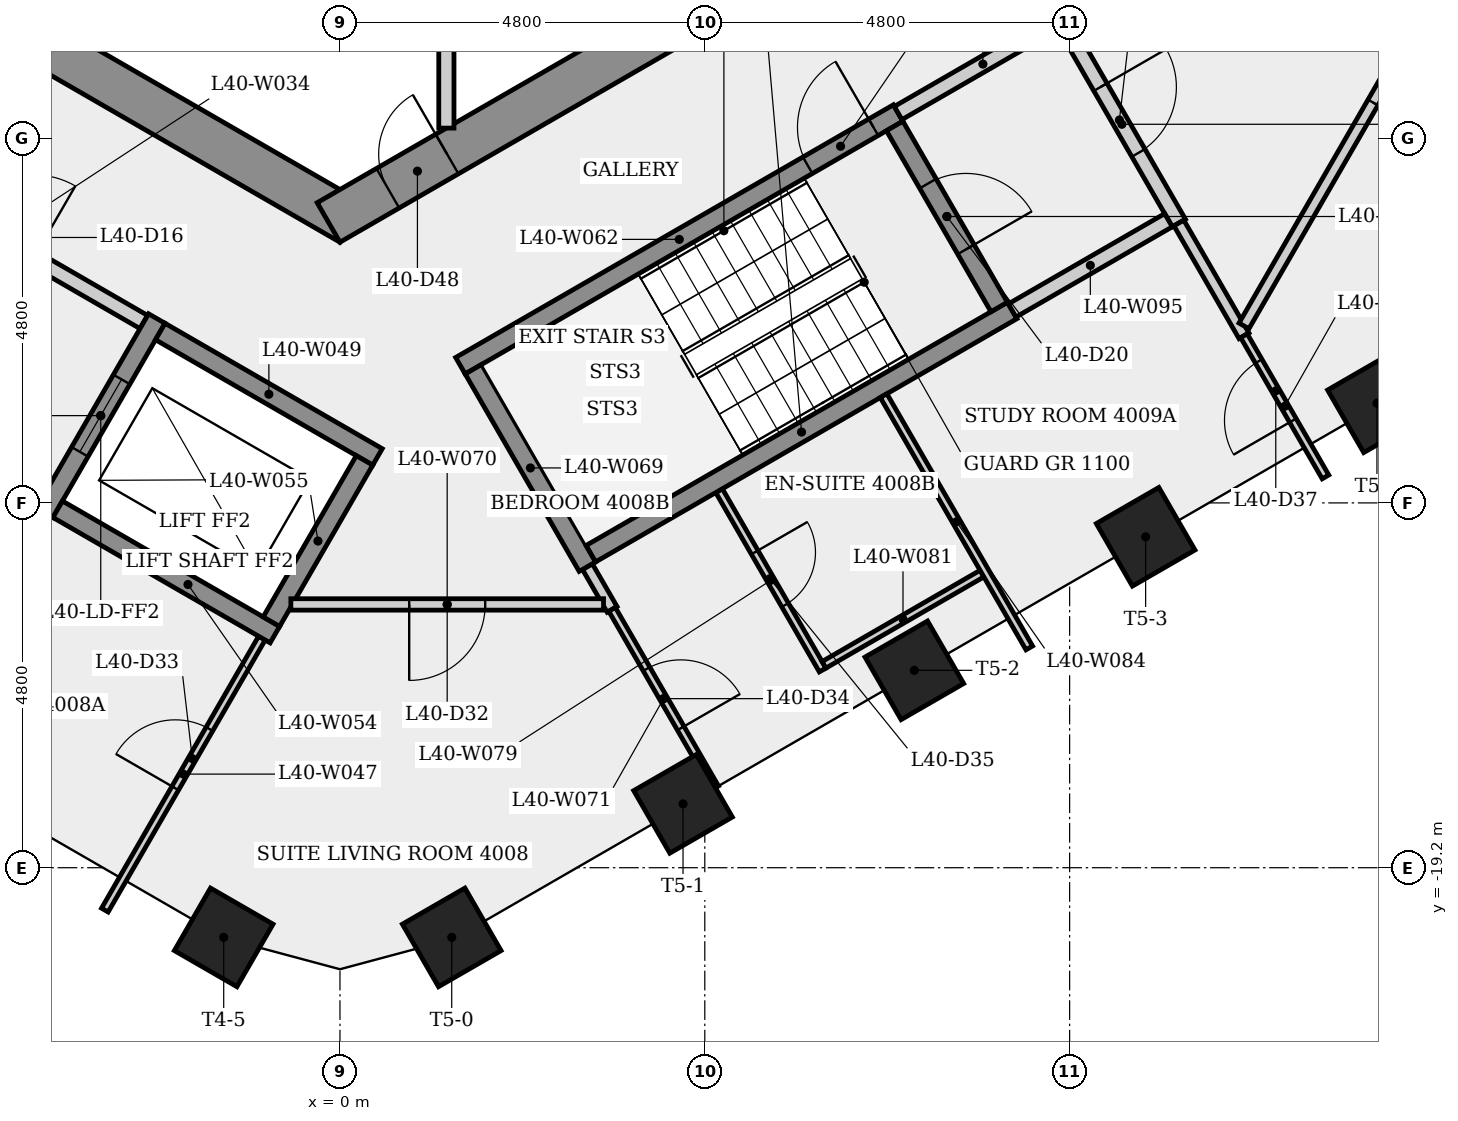
"""IFC4 building model, lengths in metres.
Left out: names, types, materials, properties, quantities, classifications, styles, units other than length and angle.
Written with IfcOpenShell. Run it as: python <this file> out.ifc"""

import sys

from ifc_helpers import new_model, si_unit, direction, frame, frame_2d, origin, origin_2d, place, context, subcontext, project, spatial, rectangle, extrude, element, fill, save


model = new_model("IFC4")
c1 = context("Model", 3, precision=1e-05, world=origin(), true_north=direction((0.0, 1.0)))
c2 = subcontext(c1, "Body", "Model", "MODEL_VIEW")
j1 = project(units=[si_unit("LENGTHUNIT", "METRE"), si_unit("PLANEANGLEUNIT", "RADIAN")], contexts=[c1])
p1 = place(None, origin())
s1 = spatial("IfcSite", under=j1, at=p1, CompositionType="ELEMENT")
p2 = place(p1, origin())
s2 = spatial("IfcBuilding", under=s1, at=p2, CompositionType="ELEMENT")
p3 = place(p2, frame((0.0, 0.0, 152.7)))
s3 = spatial("IfcBuildingStorey", under=s2, at=p3, CompositionType="ELEMENT", Elevation=152.7)
p4 = place(p3, frame((-9.35, -5.225, 0.0), z_axis=(0.0, 0.0, 1.0), x_axis=(0.866023993627, -0.500002442456, 0.0)))
e1 = element("IfcWall", 1, at=p4, inside=s3, PredefinedType="SHEAR", context=c2, shape_type="SweptSolid", body=[
    extrude(rectangle(XDim=10.97, YDim=0.6, at=frame_2d((5.485, 0.0))), origin(), (0.0, 0.0, 1.0), 3.4),
])
p5 = place(p4, frame((2.853, 0.0, 0.0)))
e2 = element("IfcOpeningElement", 2, at=p5, cuts=e1, PredefinedType="OPENING", context=c2, shape_type="SweptSolid", body=[
    extrude(rectangle(XDim=0.9, YDim=2.1, at=frame_2d((0.45, 1.05))), frame((0.0, 0.31, 0.0), z_axis=(0.0, -1.0, 0.0), x_axis=(1.0, 0.0, 0.0)), (0.0, 0.0, 1.0), 0.62),
])
p6 = place(p3, frame((-0.15, -10.71, 0.0), z_axis=(0.0, 0.0, 1.0), x_axis=(0.866023993627, 0.500002442456, 0.0)))
e3 = element("IfcWall", 3, at=p6, inside=s3, PredefinedType="SHEAR", context=c2, shape_type="SweptSolid", body=[
    extrude(rectangle(XDim=10.97, YDim=0.6, at=frame_2d((5.485, 0.0))), origin(), (0.0, 0.0, 1.0), 3.4),
])
p7 = place(p6, frame((0.9, 0.0, 0.0)))
e4 = element("IfcOpeningElement", 4, at=p7, cuts=e3, PredefinedType="OPENING", context=c2, shape_type="SweptSolid", body=[
    extrude(rectangle(XDim=0.9, YDim=2.1, at=frame_2d((0.45, 1.05))), frame((0.0, 0.31, 0.0), z_axis=(0.0, -1.0, 0.0), x_axis=(1.0, 0.0, 0.0)), (0.0, 0.0, 1.0), 0.62),
])
p8 = place(p6, frame((7.512, 0.0, 0.0)))
e5 = element("IfcOpeningElement", 5, at=p8, cuts=e3, PredefinedType="OPENING", context=c2, shape_type="SweptSolid", body=[
    extrude(rectangle(XDim=0.9, YDim=2.1, at=frame_2d((0.45, 1.05))), frame((0.0, 0.31, 0.0), z_axis=(0.0, -1.0, 0.0), x_axis=(1.0, 0.0, 0.0)), (0.0, 0.0, 1.0), 0.62),
])
for number, where, z_axis, x_axis in (
    (6, (-1.53, -20.117, 0.0), (0.0, 0.0, 1.0), (-0.5, -0.866, 0.0)),
    (7, (1.47, -20.117, 0.0), (0.0, 0.0, 1.0), (0.5, -0.866, 0.0)),
    (8, (4.514, -18.36, 0.0), (0.0, 0.0, 1.0), (0.5, -0.866, 0.0)),
    (9, (7.557, -16.603, 0.0), (0.0, 0.0, 1.0), (0.5, -0.866, 0.0)),
    (10, (10.6, -14.846, 0.0), (0.0, 0.0, 1.0), (0.5, -0.866, 0.0)),
    (11, (13.643, -13.089, 0.0), (0.0, 0.0, 1.0), (0.5, -0.866, 0.0)),
):
    element("IfcColumn", number, at=place(p3, frame(where, z_axis=z_axis, x_axis=x_axis)), inside=s3, PredefinedType="COLUMN", context=c2, shape_type="SweptSolid", body=[
        extrude(rectangle(XDim=0.95, YDim=0.95, at=origin_2d()), origin(), (0.0, 0.0, 1.0), 3.4),
    ])
p9 = place(p3, frame((-6.435, -9.795, 0.0), z_axis=(0.0, 0.0, 1.0), x_axis=(0.866012907634, -0.500021643343, 0.0)))
e12 = element("IfcWall", 12, at=p9, inside=s3, PredefinedType="PARTITIONING", context=c2, shape_type="SweptSolid", body=[
    extrude(rectangle(XDim=4.45, YDim=0.2, at=frame_2d((2.225, 0.0))), origin(), (0.0, 0.0, 1.0), 3.05),
])
p10 = place(p9, frame((1.675, 0.0, 0.0)))
e13 = element("IfcOpeningElement", 13, at=p10, cuts=e12, PredefinedType="OPENING", context=c2, shape_type="SweptSolid", body=[
    extrude(rectangle(XDim=1.1, YDim=2.1, at=frame_2d((0.55, 1.05))), frame((0.0, 0.11, 0.0), z_axis=(0.0, -1.0, 0.0), x_axis=(1.0, 0.0, 0.0)), (0.0, 0.0, 1.0), 0.22),
])
p11 = place(p3, frame((-3.094, -19.758, 0.0), z_axis=(0.0, 0.0, 1.0), x_axis=(0.500027577057, 0.866009481578, 0.0)))
e14 = element("IfcWall", 14, at=p11, inside=s3, PredefinedType="PARTITIONING", context=c2, shape_type="SweptSolid", body=[
    extrude(rectangle(XDim=4.133, YDim=0.1, at=frame_2d((2.066, 0.0))), origin(), (0.0, 0.0, 1.0), 3.05),
])
p12 = place(p11, frame((1.852, 0.0, 0.0)))
e15 = element("IfcOpeningElement", 15, at=p12, cuts=e14, PredefinedType="OPENING", context=c2, shape_type="SweptSolid", body=[
    extrude(rectangle(XDim=0.9, YDim=2.1, at=frame_2d((0.45, 1.05))), frame((0.0, 0.06, 0.0), z_axis=(0.0, -1.0, 0.0), x_axis=(1.0, 0.0, 0.0)), (0.0, 0.0, 1.0), 0.12),
])
p13 = place(p3, frame((-2.41, -11.974, 0.0), z_axis=(0.0, 0.0, 1.0), x_axis=(-0.500001826776, -0.866024349092, 0.0)))
e16 = element("IfcWall", 16, at=p13, inside=s3, PredefinedType="SHEAR", context=c2, shape_type="SweptSolid", body=[
    extrude(rectangle(XDim=2.95, YDim=0.25, at=frame_2d((1.475, 0.0))), origin(), (0.0, 0.0, 1.0), 3.05),
])
p14 = place(p13, frame((0.925, 0.0, 0.0)))
e17 = element("IfcOpeningElement", 17, at=p14, cuts=e16, PredefinedType="OPENING", context=c2, shape_type="SweptSolid", body=[
    extrude(rectangle(XDim=1.1, YDim=2.1, at=frame_2d((0.55, 1.05))), frame((0.0, 0.135, 0.0), z_axis=(0.0, -1.0, 0.0), x_axis=(1.0, 0.0, 0.0)), (0.0, 0.0, 1.0), 0.27),
])
p15 = place(p3, frame((-2.364, -12.145, 0.0), z_axis=(0.0, 0.0, 1.0), x_axis=(0.866040211805, -0.499974350878, 0.0)))
e18 = element("IfcWall", 18, at=p15, inside=s3, PredefinedType="SHEAR", context=c2, shape_type="SweptSolid", body=[
    extrude(rectangle(XDim=3.3, YDim=0.25, at=frame_2d((1.65, 0.0))), origin(), (0.0, 0.0, 1.0), 3.05),
])
p16 = place(p3, frame((-0.856, -16.133, 0.0), z_axis=(0.0, 0.0, 1.0), x_axis=(-0.866021716278, 0.500006386895, 0.0)))
e19 = element("IfcWall", 19, at=p16, inside=s3, PredefinedType="SHEAR", context=c2, shape_type="SweptSolid", body=[
    extrude(rectangle(XDim=3.3, YDim=0.25, at=frame_2d((1.65, 0.0))), origin(), (0.0, 0.0, 1.0), 3.05),
])
p17 = place(p3, frame((-0.902, -15.962, 0.0), z_axis=(0.0, 0.0, 1.0), x_axis=(0.500061746146, 0.865989751695, 0.0)))
e20 = element("IfcWall", 20, at=p17, inside=s3, PredefinedType="SHEAR", context=c2, shape_type="SweptSolid", body=[
    extrude(rectangle(XDim=2.45, YDim=0.25, at=frame_2d((1.225, 0.0))), origin(), (0.0, 0.0, 1.0), 3.4),
])
p18 = place(p3, frame((1.4, -5.25, 0.0), z_axis=(0.0, 0.0, 1.0), x_axis=(0.0, -1.0, 0.0)))
e21 = element("IfcWall", 21, at=p18, inside=s3, PredefinedType="PARTITIONING", context=c2, shape_type="SweptSolid", body=[
    extrude(rectangle(XDim=4.219, YDim=0.2, at=frame_2d((2.109, 0.0))), origin(), (0.0, 0.0, 1.0), 3.05),
])
p19 = place(p3, frame((1.585, -12.595, 0.0), z_axis=(0.0, 0.0, 1.0), x_axis=(0.866036417653, 0.499980922934, 0.0)))
e22 = element("IfcWall", 22, at=p19, inside=s3, PredefinedType="SHEAR", context=c2, shape_type="SweptSolid", body=[
    extrude(rectangle(XDim=6.65, YDim=0.25, at=frame_2d((3.325, 0.0))), origin(), (0.0, 0.0, 1.0), 3.05),
])
p20 = place(p19, frame((5.275, 0.0, 0.0)))
e23 = element("IfcOpeningElement", 23, at=p20, cuts=e22, PredefinedType="OPENING", context=c2, shape_type="SweptSolid", body=[
    extrude(rectangle(XDim=1.0, YDim=2.1, at=frame_2d((0.5, 1.05))), frame((0.0, 0.135, 0.0), z_axis=(0.0, -1.0, 0.0), x_axis=(1.0, 0.0, 0.0)), (0.0, 0.0, 1.0), 0.27),
])
p21 = place(p3, frame((3.256, -15.239, 0.0), z_axis=(0.0, 0.0, 1.0), x_axis=(0.499982980259, -0.866035229914, 0.0)))
e24 = element("IfcWall", 24, at=p21, inside=s3, PredefinedType="PARTITIONING", context=c2, shape_type="SweptSolid", body=[
    extrude(rectangle(XDim=0.649, YDim=0.15, at=frame_2d((0.324, 0.0))), origin(), (0.0, 0.0, 1.0), 3.05),
])
p22 = place(p3, frame((3.256, -15.239, 0.0), z_axis=(0.0, 0.0, 1.0), x_axis=(-0.50002537861, 0.866010750942, 0.0)))
e25 = element("IfcWall", 25, at=p22, inside=s3, PredefinedType="SHEAR", context=c2, shape_type="SweptSolid", body=[
    extrude(rectangle(XDim=3.0, YDim=0.25, at=frame_2d((1.5, 0.0))), origin(), (0.0, 0.0, 1.0), 3.05),
])
p23 = place(p3, frame((3.468, -15.736, 0.0), z_axis=(0.0, 0.0, 1.0), x_axis=(-1.0, 0.0, 0.0)))
e26 = element("IfcWall", 26, at=p23, inside=s3, PredefinedType="PARTITIONING", context=c2, shape_type="SweptSolid", body=[
    extrude(rectangle(XDim=4.114, YDim=0.15, at=frame_2d((2.057, 0.0))), origin(), (0.0, 0.0, 1.0), 3.05),
])
p24 = place(p23, frame((1.557, 0.0, 0.0)))
e27 = element("IfcOpeningElement", 27, at=p24, cuts=e26, PredefinedType="OPENING", context=c2, shape_type="SweptSolid", body=[
    extrude(rectangle(XDim=1.0, YDim=2.1, at=frame_2d((0.5, 1.05))), frame((0.0, 0.085, 0.0), z_axis=(0.0, -1.0, 0.0), x_axis=(1.0, 0.0, 0.0)), (0.0, 0.0, 1.0), 0.17),
])
p25 = place(p3, frame((3.58, -15.801, 0.0), z_axis=(0.0, 0.0, 1.0), x_axis=(0.499982159162, -0.866035703952, 0.0)))
e28 = element("IfcWall", 28, at=p25, inside=s3, PredefinedType="PARTITIONING", context=c2, shape_type="SweptSolid", body=[
    extrude(rectangle(XDim=2.712, YDim=0.1, at=frame_2d((1.356, 0.0))), origin(), (0.0, 0.0, 1.0), 3.05),
])
p26 = place(p25, frame((0.906, 0.0, 0.0)))
e29 = element("IfcOpeningElement", 29, at=p26, cuts=e28, PredefinedType="OPENING", context=c2, shape_type="SweptSolid", body=[
    extrude(rectangle(XDim=0.9, YDim=2.1, at=frame_2d((0.45, 1.05))), frame((0.0, 0.06, 0.0), z_axis=(0.0, -1.0, 0.0), x_axis=(1.0, 0.0, 0.0)), (0.0, 0.0, 1.0), 0.12),
])
p27 = place(p3, frame((4.988, -14.239, 0.0), z_axis=(0.0, 0.0, 1.0), x_axis=(0.500022328685, -0.866012511928, 0.0)))
e30 = element("IfcWall", 30, at=p27, inside=s3, PredefinedType="PARTITIONING", context=c2, shape_type="SweptSolid", body=[
    extrude(rectangle(XDim=2.725, YDim=0.1, at=frame_2d((1.363, 0.0))), origin(), (0.0, 0.0, 1.0), 3.05),
])
p28 = place(p27, frame((0.938, 0.0, 0.0)))
e31 = element("IfcOpeningElement", 31, at=p28, cuts=e30, PredefinedType="OPENING", context=c2, shape_type="SweptSolid", body=[
    extrude(rectangle(XDim=0.8, YDim=2.1, at=frame_2d((0.4, 1.05))), frame((0.0, 0.06, 0.0), z_axis=(0.0, -1.0, 0.0), x_axis=(1.0, 0.0, 0.0)), (0.0, 0.0, 1.0), 0.12),
])
p29 = place(p3, frame((3.301, -15.068, 0.0), z_axis=(0.0, 0.0, 1.0), x_axis=(0.866035036182, 0.499983315828, 0.0)))
e32 = element("IfcWall", 32, at=p29, inside=s3, PredefinedType="SHEAR", context=c2, shape_type="SweptSolid", body=[
    extrude(rectangle(XDim=6.4, YDim=0.25, at=frame_2d((3.2, 0.0))), origin(), (0.0, 0.0, 1.0), 3.05),
])
p30 = place(p3, frame((6.368, -16.531, 0.0), z_axis=(0.0, 0.0, 1.0), x_axis=(0.866006032174, 0.500033551112, 0.0)))
e33 = element("IfcWall", 33, at=p30, inside=s3, PredefinedType="PARTITIONING", context=c2, shape_type="SweptSolid", body=[
    extrude(rectangle(XDim=2.4, YDim=0.1, at=frame_2d((1.2, 0.0))), origin(), (0.0, 0.0, 1.0), 3.05),
])
p31 = place(p3, frame((7.153, -12.989, 0.0), z_axis=(0.0, 0.0, 1.0), x_axis=(0.500044099915, -0.86599994119, 0.0)))
e34 = element("IfcWall", 34, at=p31, inside=s3, PredefinedType="PARTITIONING", context=c2, shape_type="SweptSolid", body=[
    extrude(rectangle(XDim=3.833, YDim=0.1, at=frame_2d((1.917, 0.0))), origin(), (0.0, 0.0, 1.0), 3.05),
])
p32 = place(p3, frame((7.298, -9.441, 0.0), z_axis=(0.0, 0.0, 1.0), x_axis=(0.500034990121, -0.866005201286, 0.0)))
e35 = element("IfcWall", 35, at=p32, inside=s3, PredefinedType="SHEAR", context=c2, shape_type="SweptSolid", body=[
    extrude(rectangle(XDim=2.75, YDim=0.25, at=frame_2d((1.375, 0.0))), origin(), (0.0, 0.0, 1.0), 3.05),
])
p33 = place(p32, frame((0.875, 0.0, 0.0)))
e36 = element("IfcOpeningElement", 36, at=p33, cuts=e35, PredefinedType="OPENING", context=c2, shape_type="SweptSolid", body=[
    extrude(rectangle(XDim=1.0, YDim=2.1, at=frame_2d((0.5, 1.05))), frame((0.0, 0.135, 0.0), z_axis=(0.0, -1.0, 0.0), x_axis=(1.0, 0.0, 0.0)), (0.0, 0.0, 1.0), 0.27),
])
p34 = place(p3, frame((7.344, -9.27, 0.0), z_axis=(0.0, 0.0, 1.0), x_axis=(0.866005588531, 0.500034319456, 0.0)))
e37 = element("IfcWall", 37, at=p34, inside=s3, PredefinedType="PARTITIONING", context=c2, shape_type="SweptSolid", body=[
    extrude(rectangle(XDim=2.575, YDim=0.2, at=frame_2d((1.288, 0.0))), origin(), (0.0, 0.0, 1.0), 3.05),
])
p35 = place(p3, frame((9.537, -8.119, 0.0), z_axis=(0.0, 0.0, 1.0), x_axis=(0.499990139034, -0.866031096941, 0.0)))
e38 = element("IfcWall", 38, at=p35, inside=s3, PredefinedType="PARTITIONING", context=c2, shape_type="SweptSolid", body=[
    extrude(rectangle(XDim=3.0, YDim=0.2, at=frame_2d((1.5, 0.0))), origin(), (0.0, 0.0, 1.0), 3.05),
])
p36 = place(p35, frame((0.935, 0.0, 0.0)))
e39 = element("IfcOpeningElement", 39, at=p36, cuts=e38, PredefinedType="OPENING", context=c2, shape_type="SweptSolid", body=[
    extrude(rectangle(XDim=1.0, YDim=2.1, at=frame_2d((0.5, 1.05))), frame((0.0, 0.11, 0.0), z_axis=(0.0, -1.0, 0.0), x_axis=(1.0, 0.0, 0.0)), (0.0, 0.0, 1.0), 0.22),
])
p37 = place(p3, frame((10.901, -10.681, 0.0), z_axis=(0.0, 0.0, 1.0), x_axis=(-0.866007538022, -0.500030943131, 0.0)))
e40 = element("IfcWall", 40, at=p37, inside=s3, PredefinedType="PARTITIONING", context=c2, shape_type="SweptSolid", body=[
    extrude(rectangle(XDim=2.375, YDim=0.2, at=frame_2d((1.188, 0.0))), origin(), (0.0, 0.0, 1.0), 3.05),
])
p38 = place(p3, frame((11.894, -12.201, 0.0), z_axis=(0.0, 0.0, 1.0), x_axis=(-0.499878701538, 0.866095424159, 0.0)))
e41 = element("IfcWall", 41, at=p38, inside=s3, PredefinedType="PARTITIONING", context=c2, shape_type="SweptSolid", body=[
    extrude(rectangle(XDim=1.713, YDim=0.15, at=frame_2d((0.857, 0.0))), origin(), (0.0, 0.0, 1.0), 3.05),
])
p39 = place(p3, frame((12.966, -14.058, 0.0), z_axis=(0.0, 0.0, 1.0), x_axis=(-0.500057540742, 0.865992180073, 0.0)))
e42 = element("IfcWall", 42, at=p39, inside=s3, PredefinedType="PARTITIONING", context=c2, shape_type="SweptSolid", body=[
    extrude(rectangle(XDim=2.144, YDim=0.1, at=frame_2d((1.072, 0.0))), origin(), (0.0, 0.0, 1.0), 3.05),
])
p40 = place(p39, frame((0.858, 0.0, 0.0)))
e43 = element("IfcOpeningElement", 43, at=p40, cuts=e42, PredefinedType="OPENING", context=c2, shape_type="SweptSolid", body=[
    extrude(rectangle(XDim=0.9, YDim=2.1, at=frame_2d((0.45, 1.05))), frame((0.0, 0.06, 0.0), z_axis=(0.0, -1.0, 0.0), x_axis=(1.0, 0.0, 0.0)), (0.0, 0.0, 1.0), 0.12),
])
p41 = place(p3, frame((15.788, -5.326, 0.0), z_axis=(0.0, 0.0, 1.0), x_axis=(-0.500022727545, -0.866012281633, 0.0)))
e44 = element("IfcWall", 44, at=p41, inside=s3, PredefinedType="PARTITIONING", context=c2, shape_type="SweptSolid", body=[
    extrude(rectangle(XDim=7.789, YDim=0.15, at=frame_2d((3.895, 0.0))), origin(), (0.0, 0.0, 1.0), 3.05),
])
p42 = place(p41, frame((3.394, 0.0, 0.0)))
e45 = element("IfcOpeningElement", 45, at=p42, cuts=e44, PredefinedType="OPENING", context=c2, shape_type="SweptSolid", body=[
    extrude(rectangle(XDim=1.0, YDim=2.1, at=frame_2d((0.5, 1.05))), frame((0.0, 0.085, 0.0), z_axis=(0.0, -1.0, 0.0), x_axis=(1.0, 0.0, 0.0)), (0.0, 0.0, 1.0), 0.17),
])
p43 = place(p14, origin())
e46 = element("IfcDoor", 46, at=p43, inside=s3, OperationType="SLIDING_TO_LEFT", PredefinedType="DOOR", context=c2, shape_type="SweptSolid", body=[
    extrude(rectangle(XDim=1.1, YDim=2.1, at=frame_2d((0.55, 1.05))), frame((0.0, 0.025, 0.0), z_axis=(0.0, -1.0, 0.0), x_axis=(1.0, 0.0, 0.0)), (0.0, 0.0, 1.0), 0.05),
])
fill(e17, e46)
p44 = place(p20, origin())
e47 = element("IfcDoor", 47, at=p44, inside=s3, OperationType="SINGLE_SWING_RIGHT", PredefinedType="DOOR", context=c2, shape_type="SweptSolid", body=[
    extrude(rectangle(XDim=1.0, YDim=2.1, at=frame_2d((0.5, 1.05))), frame((0.0, 0.025, 0.0), z_axis=(0.0, -1.0, 0.0), x_axis=(1.0, 0.0, 0.0)), (0.0, 0.0, 1.0), 0.05),
])
fill(e23, e47)
p45 = place(p36, origin())
e48 = element("IfcDoor", 48, at=p45, inside=s3, OperationType="SINGLE_SWING_LEFT", PredefinedType="DOOR", context=c2, shape_type="SweptSolid", body=[
    extrude(rectangle(XDim=1.0, YDim=2.1, at=frame_2d((0.5, 1.05))), frame((0.0, 0.025, 0.0), z_axis=(0.0, -1.0, 0.0), x_axis=(1.0, 0.0, 0.0)), (0.0, 0.0, 1.0), 0.05),
])
fill(e39, e48)
p46 = place(p33, origin())
e49 = element("IfcDoor", 49, at=p46, inside=s3, OperationType="SINGLE_SWING_RIGHT", PredefinedType="DOOR", context=c2, shape_type="SweptSolid", body=[
    extrude(rectangle(XDim=1.0, YDim=2.1, at=frame_2d((0.5, 1.05))), frame((0.0, 0.025, 0.0), z_axis=(0.0, -1.0, 0.0), x_axis=(1.0, 0.0, 0.0)), (0.0, 0.0, 1.0), 0.05),
])
fill(e36, e49)
p47 = place(p24, origin())
e50 = element("IfcDoor", 50, at=p47, inside=s3, OperationType="SINGLE_SWING_RIGHT", PredefinedType="DOOR", context=c2, shape_type="SweptSolid", body=[
    extrude(rectangle(XDim=1.0, YDim=2.1, at=frame_2d((0.5, 1.05))), frame((0.0, 0.025, 0.0), z_axis=(0.0, -1.0, 0.0), x_axis=(1.0, 0.0, 0.0)), (0.0, 0.0, 1.0), 0.05),
])
fill(e27, e50)
p48 = place(p12, origin())
e51 = element("IfcDoor", 51, at=p48, inside=s3, OperationType="SINGLE_SWING_LEFT", PredefinedType="DOOR", context=c2, shape_type="SweptSolid", body=[
    extrude(rectangle(XDim=0.9, YDim=2.1, at=frame_2d((0.45, 1.05))), frame((0.0, 0.025, 0.0), z_axis=(0.0, -1.0, 0.0), x_axis=(1.0, 0.0, 0.0)), (0.0, 0.0, 1.0), 0.05),
])
fill(e15, e51)
p49 = place(p26, origin())
e52 = element("IfcDoor", 52, at=p49, inside=s3, OperationType="SINGLE_SWING_RIGHT", PredefinedType="DOOR", context=c2, shape_type="SweptSolid", body=[
    extrude(rectangle(XDim=0.9, YDim=2.1, at=frame_2d((0.45, 1.05))), frame((0.0, 0.025, 0.0), z_axis=(0.0, -1.0, 0.0), x_axis=(1.0, 0.0, 0.0)), (0.0, 0.0, 1.0), 0.05),
])
fill(e29, e52)
p50 = place(p28, origin())
e53 = element("IfcDoor", 53, at=p50, inside=s3, OperationType="SINGLE_SWING_LEFT", PredefinedType="DOOR", context=c2, shape_type="SweptSolid", body=[
    extrude(rectangle(XDim=0.8, YDim=2.1, at=frame_2d((0.4, 1.05))), frame((0.0, 0.025, 0.0), z_axis=(0.0, -1.0, 0.0), x_axis=(1.0, 0.0, 0.0)), (0.0, 0.0, 1.0), 0.05),
])
fill(e31, e53)
p51 = place(p42, origin())
e54 = element("IfcDoor", 54, at=p51, inside=s3, OperationType="SINGLE_SWING_RIGHT", PredefinedType="DOOR", context=c2, shape_type="SweptSolid", body=[
    extrude(rectangle(XDim=1.0, YDim=2.1, at=frame_2d((0.5, 1.05))), frame((0.0, 0.025, 0.0), z_axis=(0.0, -1.0, 0.0), x_axis=(1.0, 0.0, 0.0)), (0.0, 0.0, 1.0), 0.05),
])
fill(e45, e54)
p52 = place(p40, origin())
e55 = element("IfcDoor", 55, at=p52, inside=s3, OperationType="SINGLE_SWING_LEFT", PredefinedType="DOOR", context=c2, shape_type="SweptSolid", body=[
    extrude(rectangle(XDim=0.9, YDim=2.1, at=frame_2d((0.45, 1.05))), frame((0.0, 0.025, 0.0), z_axis=(0.0, -1.0, 0.0), x_axis=(1.0, 0.0, 0.0)), (0.0, 0.0, 1.0), 0.05),
])
fill(e43, e55)
p53 = place(p7, origin())
e56 = element("IfcDoor", 56, at=p53, inside=s3, OperationType="SINGLE_SWING_RIGHT", PredefinedType="DOOR", context=c2, shape_type="SweptSolid", body=[
    extrude(rectangle(XDim=0.9, YDim=2.1, at=frame_2d((0.45, 1.05))), frame((0.0, 0.025, 0.0), z_axis=(0.0, -1.0, 0.0), x_axis=(1.0, 0.0, 0.0)), (0.0, 0.0, 1.0), 0.05),
])
fill(e4, e56)
save(model, sys.argv[1])
